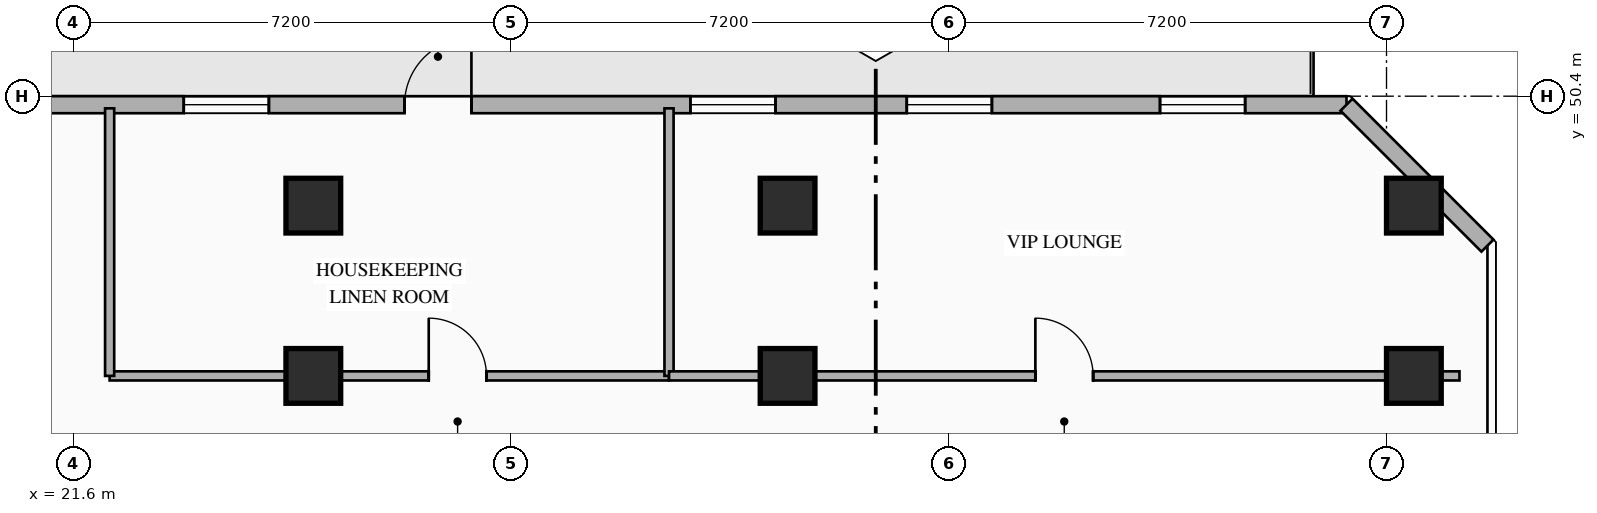
"""IFC4 building model, lengths in metres.
Left out: names, types, materials, properties, quantities, classifications, styles, units other than length and angle.
Written with IfcOpenShell. Run it as: python <this file> out.ifc"""

import sys

from ifc_helpers import new_model, si_unit, direction, frame, frame_2d, origin, origin_2d, place, context, subcontext, project, spatial, rectangle, hollow_rectangle, extrude, element, fill, save


model = new_model("IFC4")
c1 = context("Model", 3, precision=1e-05, world=origin(), true_north=direction((0.0, 1.0)))
c2 = subcontext(c1, "Body", "Model", "MODEL_VIEW")
j1 = project(units=[si_unit("LENGTHUNIT", "METRE"), si_unit("PLANEANGLEUNIT", "RADIAN")], contexts=[c1])
p1 = place(None, origin())
s1 = spatial("IfcSite", under=j1, at=p1, CompositionType="ELEMENT")
p2 = place(p1, origin())
s2 = spatial("IfcBuilding", under=s1, at=p2, CompositionType="ELEMENT")
p3 = place(p2, frame((0.0, 0.0, 77.95)))
s3 = spatial("IfcBuildingStorey", under=s2, at=p3, CompositionType="ELEMENT", Elevation=77.95)
for number, where, z_axis, x_axis in (
    (1, (25.55, 45.8, 0.0), (0.0, 0.0, 1.0), (1.0, 0.0, 0.0)),
    (2, (33.35, 45.8, 0.0), (0.0, 0.0, 1.0), (1.0, 0.0, 0.0)),
    (3, (43.65, 45.8, 0.0), (0.0, 0.0, 1.0), (1.0, 0.0, 0.0)),
    (4, (25.55, 48.6, 0.0), (0.0, 0.0, 1.0), (1.0, 0.0, 0.0)),
    (5, (33.35, 48.6, 0.0), (0.0, 0.0, 1.0), (1.0, 0.0, 0.0)),
    (6, (43.65, 48.6, 0.0), (0.0, 0.0, 1.0), (1.0, 0.0, 0.0)),
):
    element("IfcColumn", number, at=place(p3, frame(where, z_axis=z_axis, x_axis=x_axis)), inside=s3, PredefinedType="COLUMN", context=c2, shape_type="SweptSolid", body=[
        extrude(hollow_rectangle(XDim=0.9, YDim=0.9, WallThickness=0.036, at=origin_2d()), origin(), (0.0, 0.0, 1.0), 3.35),
    ])
p4 = place(p3, frame((12.058, 50.26, 0.0), z_axis=(0.0, 0.0, 1.0), x_axis=(1.0, 0.0, 0.0)))
e7 = element("IfcWall", 7, at=p4, inside=s3, PredefinedType="STANDARD", context=c2, shape_type="SweptSolid", body=[
    extrude(rectangle(XDim=30.484, YDim=0.28, at=frame_2d((15.242, 0.0))), origin(), (0.0, 0.0, 1.0), 3.13),
])
p5 = place(p4, frame((14.992, 0.0, 0.0)))
e8 = element("IfcOpeningElement", 8, at=p5, cuts=e7, PredefinedType="OPENING", context=c2, shape_type="SweptSolid", body=[
    extrude(rectangle(XDim=1.1, YDim=2.2, at=frame_2d((0.55, 1.1))), frame((0.0, 0.15, 0.0), z_axis=(0.0, -1.0, 0.0), x_axis=(1.0, 0.0, 0.0)), (0.0, 0.0, 1.0), 0.3),
])
p6 = place(p4, frame((0.653, 0.0, 0.85)))
e9 = element("IfcOpeningElement", 9, at=p6, cuts=e7, PredefinedType="OPENING", context=c2, shape_type="SweptSolid", body=[
    extrude(rectangle(XDim=1.4, YDim=1.8, at=frame_2d((0.7, 0.9))), frame((0.0, 0.15, 0.0), z_axis=(0.0, -1.0, 0.0), x_axis=(1.0, 0.0, 0.0)), (0.0, 0.0, 1.0), 0.3),
])
p7 = place(p4, frame((4.435, 0.0, 0.85)))
e10 = element("IfcOpeningElement", 10, at=p7, cuts=e7, PredefinedType="OPENING", context=c2, shape_type="SweptSolid", body=[
    extrude(rectangle(XDim=1.4, YDim=1.8, at=frame_2d((0.7, 0.9))), frame((0.0, 0.15, 0.0), z_axis=(0.0, -1.0, 0.0), x_axis=(1.0, 0.0, 0.0)), (0.0, 0.0, 1.0), 0.3),
])
p8 = place(p4, frame((11.361, 0.0, 0.85)))
e11 = element("IfcOpeningElement", 11, at=p8, cuts=e7, PredefinedType="OPENING", context=c2, shape_type="SweptSolid", body=[
    extrude(rectangle(XDim=1.4, YDim=1.8, at=frame_2d((0.7, 0.9))), frame((0.0, 0.15, 0.0), z_axis=(0.0, -1.0, 0.0), x_axis=(1.0, 0.0, 0.0)), (0.0, 0.0, 1.0), 0.3),
])
p9 = place(p4, frame((19.693, 0.0, 0.85)))
e12 = element("IfcOpeningElement", 12, at=p9, cuts=e7, PredefinedType="OPENING", context=c2, shape_type="SweptSolid", body=[
    extrude(rectangle(XDim=1.4, YDim=1.8, at=frame_2d((0.7, 0.9))), frame((0.0, 0.15, 0.0), z_axis=(0.0, -1.0, 0.0), x_axis=(1.0, 0.0, 0.0)), (0.0, 0.0, 1.0), 0.3),
])
p10 = place(p4, frame((23.252, 0.0, 0.85)))
e13 = element("IfcOpeningElement", 13, at=p10, cuts=e7, PredefinedType="OPENING", context=c2, shape_type="SweptSolid", body=[
    extrude(rectangle(XDim=1.4, YDim=1.8, at=frame_2d((0.7, 0.9))), frame((0.0, 0.15, 0.0), z_axis=(0.0, -1.0, 0.0), x_axis=(1.0, 0.0, 0.0)), (0.0, 0.0, 1.0), 0.3),
])
p11 = place(p4, frame((27.417, 0.0, 0.85)))
e14 = element("IfcOpeningElement", 14, at=p11, cuts=e7, PredefinedType="OPENING", context=c2, shape_type="SweptSolid", body=[
    extrude(rectangle(XDim=1.4, YDim=1.8, at=frame_2d((0.7, 0.9))), frame((0.0, 0.15, 0.0), z_axis=(0.0, -1.0, 0.0), x_axis=(1.0, 0.0, 0.0)), (0.0, 0.0, 1.0), 0.3),
])
p12 = place(p3, frame((42.542, 50.26, 0.0), z_axis=(0.0, 0.0, 1.0), x_axis=(0.707106781187, -0.707106781187, 0.0)))
e15 = element("IfcWall", 15, at=p12, inside=s3, PredefinedType="STANDARD", context=c2, shape_type="SweptSolid", body=[
    extrude(rectangle(XDim=3.278, YDim=0.28, at=frame_2d((1.639, 0.0))), origin(), (0.0, 0.0, 1.0), 3.13),
])
p13 = place(p3, frame((22.2, 45.8, 0.0), z_axis=(0.0, 0.0, 1.0), x_axis=(1.0, 0.0, 0.0)))
e16 = element("IfcWall", 16, at=p13, inside=s3, PredefinedType="PARTITIONING", context=c2, shape_type="SweptSolid", body=[
    extrude(rectangle(XDim=9.2, YDim=0.15, at=frame_2d((4.6, 0.0))), origin(), (0.0, 0.0, 1.0), 2.425),
])
p14 = place(p13, frame((5.248, 0.0, 0.0)))
e17 = element("IfcOpeningElement", 17, at=p14, cuts=e16, PredefinedType="OPENING", context=c2, shape_type="SweptSolid", body=[
    extrude(rectangle(XDim=0.95, YDim=2.15, at=frame_2d((0.475, 1.075))), frame((0.0, 0.085, 0.0), z_axis=(0.0, -1.0, 0.0), x_axis=(1.0, 0.0, 0.0)), (0.0, 0.0, 1.0), 0.17),
])
for number, where, z_axis, x_axis in (
    (18, (22.2, 45.8, 0.0), (0.0, 0.0, 1.0), (0.0, 1.0, 0.0)),
    (19, (31.4, 45.8, 0.0), (0.0, 0.0, 1.0), (0.0, 1.0, 0.0)),
):
    element("IfcWall", number, at=place(p3, frame(where, z_axis=z_axis, x_axis=x_axis)), inside=s3, PredefinedType="PARTITIONING", context=c2, shape_type="SweptSolid", body=[
        extrude(rectangle(XDim=4.4, YDim=0.15, at=frame_2d((2.2, 0.0))), origin(), (0.0, 0.0, 1.0), 3.13),
    ])
p15 = place(p3, frame((31.4, 45.8, 0.0), z_axis=(0.0, 0.0, 1.0), x_axis=(1.0, 0.0, 0.0)))
e20 = element("IfcWall", 20, at=p15, inside=s3, PredefinedType="PARTITIONING", context=c2, shape_type="SweptSolid", body=[
    extrude(rectangle(XDim=13.0, YDim=0.15, at=frame_2d((6.5, 0.0))), origin(), (0.0, 0.0, 1.0), 2.425),
])
p16 = place(p15, frame((6.025, 0.0, 0.0)))
e21 = element("IfcOpeningElement", 21, at=p16, cuts=e20, PredefinedType="OPENING", context=c2, shape_type="SweptSolid", body=[
    extrude(rectangle(XDim=0.95, YDim=2.15, at=frame_2d((0.475, 1.075))), frame((0.0, 0.085, 0.0), z_axis=(0.0, -1.0, 0.0), x_axis=(1.0, 0.0, 0.0)), (0.0, 0.0, 1.0), 0.17),
])
p17 = place(p5, origin())
e22 = element("IfcDoor", 22, at=p17, inside=s3, OperationType="SINGLE_SWING_RIGHT", PredefinedType="DOOR", context=c2, shape_type="SweptSolid", body=[
    extrude(rectangle(XDim=1.1, YDim=2.2, at=frame_2d((0.55, 1.1))), frame((0.0, 0.025, 0.0), z_axis=(0.0, -1.0, 0.0), x_axis=(1.0, 0.0, 0.0)), (0.0, 0.0, 1.0), 0.05),
])
fill(e8, e22)
p18 = place(p8, origin())
e23 = element("IfcWindow", 23, at=p18, inside=s3, PartitioningType="SINGLE_PANEL", PredefinedType="WINDOW", context=c2, shape_type="SweptSolid", body=[
    extrude(rectangle(XDim=1.4, YDim=1.8, at=frame_2d((0.7, 0.9))), frame((0.0, 0.03, 0.0), z_axis=(0.0, -1.0, 0.0), x_axis=(1.0, 0.0, 0.0)), (0.0, 0.0, 1.0), 0.06),
])
fill(e11, e23)
p19 = place(p9, origin())
e24 = element("IfcWindow", 24, at=p19, inside=s3, PartitioningType="SINGLE_PANEL", PredefinedType="WINDOW", context=c2, shape_type="SweptSolid", body=[
    extrude(rectangle(XDim=1.4, YDim=1.8, at=frame_2d((0.7, 0.9))), frame((0.0, 0.03, 0.0), z_axis=(0.0, -1.0, 0.0), x_axis=(1.0, 0.0, 0.0)), (0.0, 0.0, 1.0), 0.06),
])
fill(e12, e24)
p20 = place(p10, origin())
e25 = element("IfcWindow", 25, at=p20, inside=s3, PartitioningType="SINGLE_PANEL", PredefinedType="WINDOW", context=c2, shape_type="SweptSolid", body=[
    extrude(rectangle(XDim=1.4, YDim=1.8, at=frame_2d((0.7, 0.9))), frame((0.0, 0.03, 0.0), z_axis=(0.0, -1.0, 0.0), x_axis=(1.0, 0.0, 0.0)), (0.0, 0.0, 1.0), 0.06),
])
fill(e13, e25)
p21 = place(p11, origin())
e26 = element("IfcWindow", 26, at=p21, inside=s3, PartitioningType="SINGLE_PANEL", PredefinedType="WINDOW", context=c2, shape_type="SweptSolid", body=[
    extrude(rectangle(XDim=1.4, YDim=1.8, at=frame_2d((0.7, 0.9))), frame((0.0, 0.03, 0.0), z_axis=(0.0, -1.0, 0.0), x_axis=(1.0, 0.0, 0.0)), (0.0, 0.0, 1.0), 0.06),
])
fill(e14, e26)
p22 = place(p14, origin())
e27 = element("IfcDoor", 27, at=p22, inside=s3, OperationType="SINGLE_SWING_LEFT", PredefinedType="DOOR", context=c2, shape_type="SweptSolid", body=[
    extrude(rectangle(XDim=0.95, YDim=2.15, at=frame_2d((0.475, 1.075))), frame((0.0, 0.025, 0.0), z_axis=(0.0, -1.0, 0.0), x_axis=(1.0, 0.0, 0.0)), (0.0, 0.0, 1.0), 0.05),
])
fill(e17, e27)
p23 = place(p16, origin())
e28 = element("IfcDoor", 28, at=p23, inside=s3, OperationType="SINGLE_SWING_LEFT", PredefinedType="DOOR", context=c2, shape_type="SweptSolid", body=[
    extrude(rectangle(XDim=0.95, YDim=2.15, at=frame_2d((0.475, 1.075))), frame((0.0, 0.025, 0.0), z_axis=(0.0, -1.0, 0.0), x_axis=(1.0, 0.0, 0.0)), (0.0, 0.0, 1.0), 0.05),
])
fill(e21, e28)
save(model, sys.argv[1])
